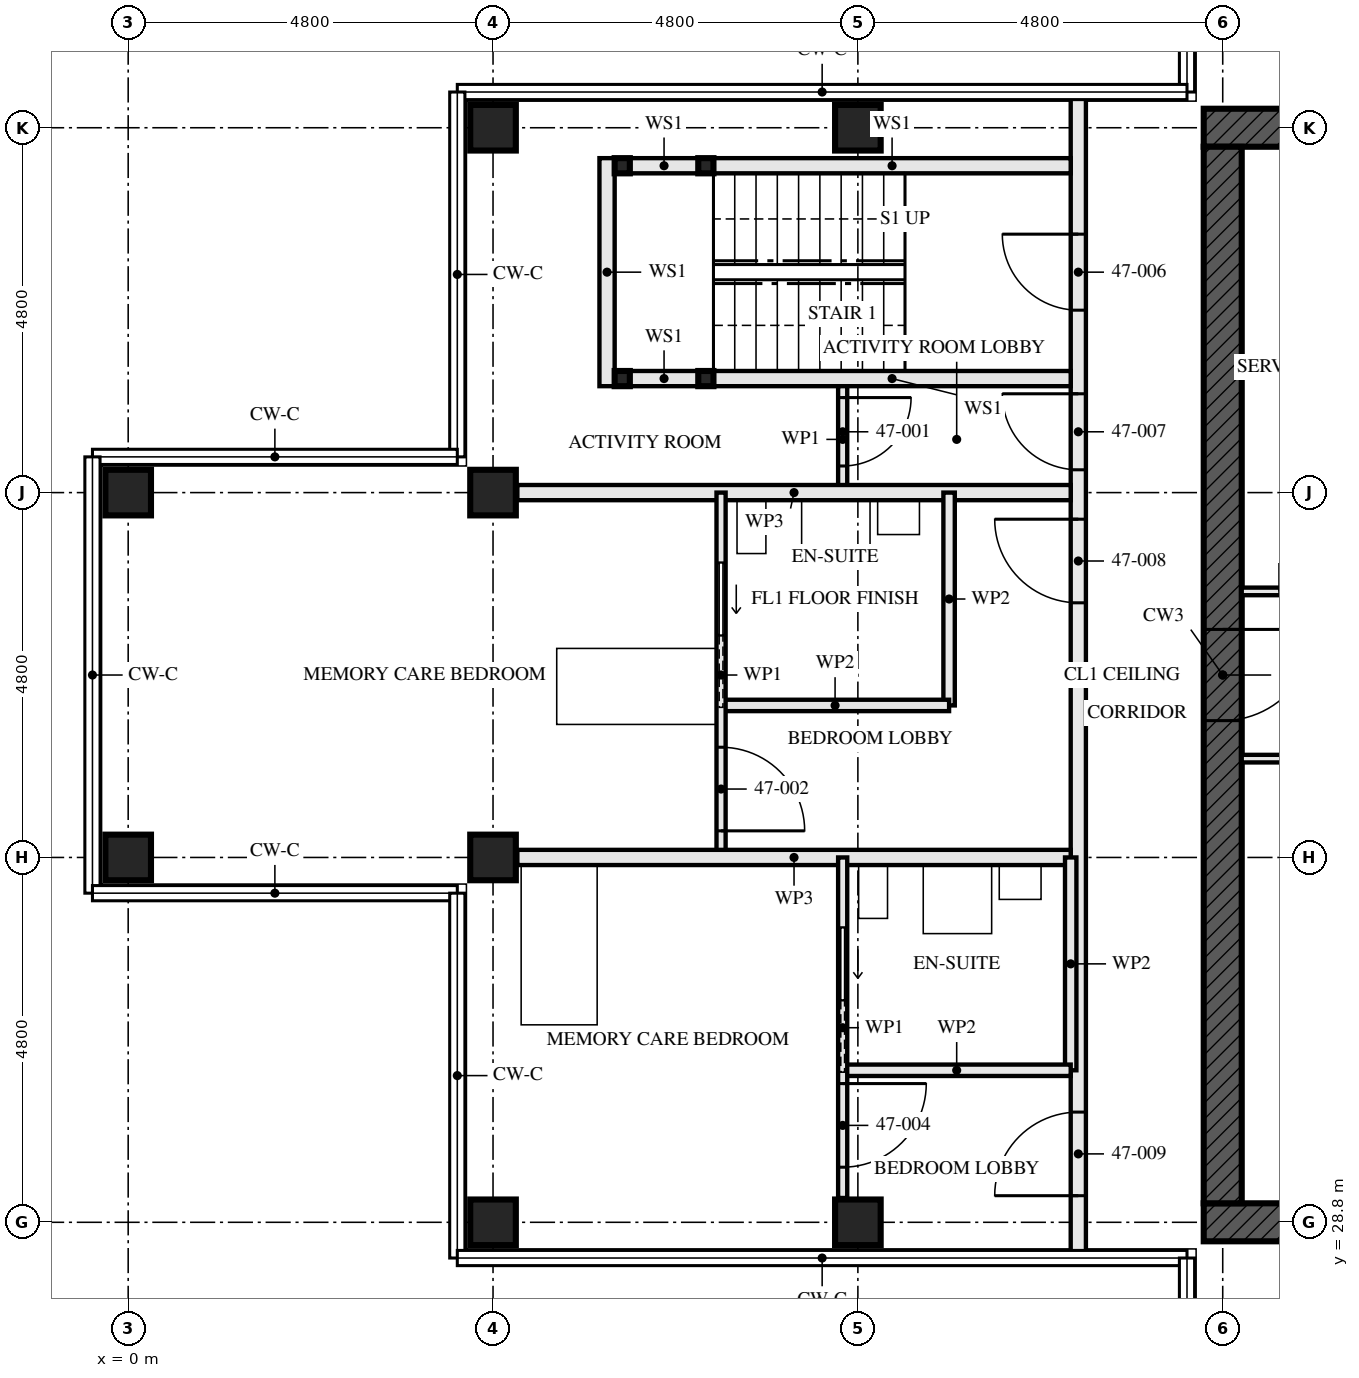
"""IFC4 building model, lengths in metres.
Left out: names, types, materials, properties, quantities, classifications, styles, units other than length and angle.
Written with IfcOpenShell. Run it as: python <this file> out.ifc"""

import sys

from ifc_helpers import new_model, si_unit, direction, frame, frame_2d, origin, origin_2d, place, context, subcontext, project, spatial, rectangle, hollow_rectangle, extrude, element, fill, save


model = new_model("IFC4")
c1 = context("Model", 3, precision=1e-05, world=origin(), true_north=direction((0.0, 1.0)))
c2 = subcontext(c1, "Body", "Model", "MODEL_VIEW")
j1 = project(units=[si_unit("LENGTHUNIT", "METRE"), si_unit("PLANEANGLEUNIT", "RADIAN")], contexts=[c1])
p1 = place(None, origin())
s1 = spatial("IfcSite", under=j1, at=p1, CompositionType="ELEMENT")
p2 = place(p1, origin())
s2 = spatial("IfcBuilding", under=s1, at=p2, CompositionType="ELEMENT")
p3 = place(p2, frame((0.0, 0.0, 172.5)))
s3 = spatial("IfcBuildingStorey", under=s2, at=p3, CompositionType="ELEMENT", Elevation=172.5)
for number, where, z_axis, x_axis in (
    (1, (0.0, 33.6, 0.0), (0.0, 0.0, 1.0), (0.0, 1.0, 0.0)),
    (2, (0.0, 38.4, 0.0), (0.0, 0.0, 1.0), (0.0, 1.0, 0.0)),
    (3, (4.8, 28.8, 0.0), (0.0, 0.0, 1.0), (0.0, 1.0, 0.0)),
    (4, (4.8, 33.6, 0.0), (0.0, 0.0, 1.0), (0.0, 1.0, 0.0)),
    (5, (4.8, 38.4, 0.0), (0.0, 0.0, 1.0), (0.0, 1.0, 0.0)),
    (6, (4.8, 43.2, 0.0), (0.0, 0.0, 1.0), (0.0, 1.0, 0.0)),
    (7, (9.6, 28.8, 0.0), (0.0, 0.0, 1.0), (0.0, 1.0, 0.0)),
    (8, (9.6, 43.2, 0.0), (0.0, 0.0, 1.0), (0.0, 1.0, 0.0)),
):
    element("IfcColumn", number, at=place(p3, frame(where, z_axis=z_axis, x_axis=x_axis)), inside=s3, PredefinedType="COLUMN", context=c2, shape_type="SweptSolid", body=[
        extrude(hollow_rectangle(XDim=0.6, YDim=0.6, WallThickness=0.08, at=origin_2d()), origin(), (0.0, 0.0, 1.0), 3.5),
    ])
p4 = place(p3, frame((14.15, 28.8, -0.17), z_axis=(0.0, 0.0, 1.0), x_axis=(1.0, 0.0, 0.0)))
e9 = element("IfcWall", 9, at=p4, inside=s3, PredefinedType="SHEAR", context=c2, shape_type="SweptSolid", body=[
    extrude(rectangle(XDim=14.9, YDim=0.5, at=frame_2d((7.45, 0.0))), origin(), (0.0, 0.0, 1.0), 3.5),
])
p5 = place(p4, frame((6.85, 0.0, 0.17)))
e10 = element("IfcOpeningElement", 10, at=p5, cuts=e9, PredefinedType="OPENING", context=c2, shape_type="SweptSolid", body=[
    extrude(rectangle(XDim=1.2, YDim=2.1, at=frame_2d((0.6, 1.05))), frame((0.0, 0.26, 0.0), z_axis=(0.0, -1.0, 0.0), x_axis=(1.0, 0.0, 0.0)), (0.0, 0.0, 1.0), 0.521),
])
p6 = place(p3, frame((29.05, 43.2, -0.17), z_axis=(0.0, 0.0, 1.0), x_axis=(-1.0, 0.0, 0.0)))
e11 = element("IfcWall", 11, at=p6, inside=s3, PredefinedType="SHEAR", context=c2, shape_type="SweptSolid", body=[
    extrude(rectangle(XDim=14.9, YDim=0.5, at=frame_2d((7.45, 0.0))), origin(), (0.0, 0.0, 1.0), 3.5),
])
p7 = place(p6, frame((6.85, 0.0, 0.17)))
e12 = element("IfcOpeningElement", 12, at=p7, cuts=e11, PredefinedType="OPENING", context=c2, shape_type="SweptSolid", body=[
    extrude(rectangle(XDim=1.2, YDim=2.1, at=frame_2d((0.6, 1.05))), frame((0.0, 0.26, 0.0), z_axis=(0.0, -1.0, 0.0), x_axis=(1.0, 0.0, 0.0)), (0.0, 0.0, 1.0), 0.521),
])
p8 = place(p3, frame((14.4, 42.95, -0.17), z_axis=(0.0, 0.0, 1.0), x_axis=(0.0, -1.0, 0.0)))
e13 = element("IfcWall", 13, at=p8, inside=s3, PredefinedType="SHEAR", context=c2, shape_type="SweptSolid", body=[
    extrude(rectangle(XDim=13.9, YDim=0.5, at=frame_2d((6.95, 0.0))), origin(), (0.0, 0.0, 1.0), 3.5),
])
p9 = place(p8, frame((6.35, 0.0, 0.17)))
e14 = element("IfcOpeningElement", 14, at=p9, cuts=e13, PredefinedType="OPENING", context=c2, shape_type="SweptSolid", body=[
    extrude(rectangle(XDim=1.2, YDim=2.1, at=frame_2d((0.6, 1.05))), frame((0.0, 0.26, 0.0), z_axis=(0.0, -1.0, 0.0), x_axis=(1.0, 0.0, 0.0)), (0.0, 0.0, 1.0), 0.521),
])
for number, where, z_axis, x_axis in (
    (15, (6.5, 42.7, 0.0), (0.0, 0.0, 1.0), (1.0, 0.0, 0.0)),
    (16, (6.5, 39.9, 0.0), (0.0, 0.0, 1.0), (1.0, 0.0, 0.0)),
    (17, (7.6, 42.7, 0.0), (0.0, 0.0, 1.0), (1.0, 0.0, 0.0)),
    (18, (7.6, 39.9, 0.0), (0.0, 0.0, 1.0), (1.0, 0.0, 0.0)),
):
    element("IfcColumn", number, at=place(p3, frame(where, z_axis=z_axis, x_axis=x_axis)), inside=s3, PredefinedType="COLUMN", context=c2, shape_type="SweptSolid", body=[
        extrude(hollow_rectangle(XDim=0.2, YDim=0.2, WallThickness=0.008, at=origin_2d()), origin(), (0.0, 0.0, 1.0), 3.33),
    ])
p10 = place(p3, frame((6.6, 42.7, 0.0), z_axis=(0.0, 0.0, 1.0), x_axis=(1.0, 0.0, 0.0)))
e19 = element("IfcWall", 19, at=p10, inside=s3, PredefinedType="SOLIDWALL", context=c2, shape_type="SweptSolid", body=[
    extrude(rectangle(XDim=0.9, YDim=0.2, at=frame_2d((0.45, 0.0))), origin(), (0.0, 0.0, 1.0), 2.99),
])
p11 = place(p3, frame((7.7, 42.7, 0.0), z_axis=(0.0, 0.0, 1.0), x_axis=(1.0, 0.0, 0.0)))
e20 = element("IfcWall", 20, at=p11, inside=s3, PredefinedType="SOLIDWALL", context=c2, shape_type="SweptSolid", body=[
    extrude(rectangle(XDim=4.7, YDim=0.2, at=frame_2d((2.35, 0.0))), origin(), (0.0, 0.0, 1.0), 2.99),
])
p12 = place(p3, frame((6.6, 39.9, 0.0), z_axis=(0.0, 0.0, 1.0), x_axis=(1.0, 0.0, 0.0)))
e21 = element("IfcWall", 21, at=p12, inside=s3, PredefinedType="SOLIDWALL", context=c2, shape_type="SweptSolid", body=[
    extrude(rectangle(XDim=0.9, YDim=0.2, at=frame_2d((0.45, 0.0))), origin(), (0.0, 0.0, 1.0), 2.99),
])
p13 = place(p3, frame((7.7, 39.9, 0.0), z_axis=(0.0, 0.0, 1.0), x_axis=(1.0, 0.0, 0.0)))
e22 = element("IfcWall", 22, at=p13, inside=s3, PredefinedType="SOLIDWALL", context=c2, shape_type="SweptSolid", body=[
    extrude(rectangle(XDim=4.7, YDim=0.2, at=frame_2d((2.35, 0.0))), origin(), (0.0, 0.0, 1.0), 2.99),
])
p14 = place(p3, frame((6.3, 42.8, 0.0), z_axis=(0.0, 0.0, 1.0), x_axis=(0.0, -1.0, 0.0)))
e23 = element("IfcWall", 23, at=p14, inside=s3, PredefinedType="SOLIDWALL", context=c2, shape_type="SweptSolid", body=[
    extrude(rectangle(XDim=3.0, YDim=0.2, at=frame_2d((1.5, 0.0))), origin(), (0.0, 0.0, 1.0), 3.33),
])
p15 = place(p3, frame((9.4, 39.8, 0.0), z_axis=(0.0, 0.0, 1.0), x_axis=(0.0, -1.0, 0.0)))
e24 = element("IfcWall", 24, at=p15, inside=s3, PredefinedType="PARTITIONING", context=c2, shape_type="SweptSolid", body=[
    extrude(rectangle(XDim=1.4, YDim=0.12, at=frame_2d((0.7, 0.0))), origin(), (0.0, 0.0, 1.0), 3.33),
])
p16 = place(p15, frame((0.15, 0.0, 0.0)))
e25 = element("IfcOpeningElement", 25, at=p16, cuts=e24, PredefinedType="OPENING", context=c2, shape_type="SweptSolid", body=[
    extrude(rectangle(XDim=0.9, YDim=2.1, at=frame_2d((0.45, 1.05))), frame((0.0, 0.071, 0.0), z_axis=(0.0, -1.0, 0.0), x_axis=(1.0, 0.0, 0.0)), (0.0, 0.0, 1.0), 0.141),
])
p17 = place(p3, frame((5.12, 38.4, 0.0), z_axis=(0.0, 0.0, 1.0), x_axis=(1.0, 0.0, 0.0)))
e26 = element("IfcWall", 26, at=p17, inside=s3, PredefinedType="PARTITIONING", context=c2, shape_type="SweptSolid", body=[
    extrude(rectangle(XDim=7.28, YDim=0.2, at=frame_2d((3.64, 0.0))), origin(), (0.0, 0.0, 1.0), 2.55),
])
p18 = place(p3, frame((7.8, 35.6, 0.0), z_axis=(0.0, 0.0, 1.0), x_axis=(1.0, 0.0, 0.0)))
e27 = element("IfcWall", 27, at=p18, inside=s3, PredefinedType="PARTITIONING", context=c2, shape_type="SweptSolid", body=[
    extrude(rectangle(XDim=3.0, YDim=0.15, at=frame_2d((1.5, 0.0))), origin(), (0.0, 0.0, 1.0), 3.33),
])
p19 = place(p3, frame((10.8, 38.4, 0.0), z_axis=(0.0, 0.0, 1.0), x_axis=(0.0, -1.0, 0.0)))
e28 = element("IfcWall", 28, at=p19, inside=s3, PredefinedType="PARTITIONING", context=c2, shape_type="SweptSolid", body=[
    extrude(rectangle(XDim=2.8, YDim=0.15, at=frame_2d((1.4, 0.0))), origin(), (0.0, 0.0, 1.0), 3.33),
])
p20 = place(p3, frame((7.8, 38.4, 0.0), z_axis=(0.0, 0.0, 1.0), x_axis=(0.0, -1.0, 0.0)))
e29 = element("IfcWall", 29, at=p20, inside=s3, PredefinedType="PARTITIONING", context=c2, shape_type="SweptSolid", body=[
    extrude(rectangle(XDim=4.8, YDim=0.12, at=frame_2d((2.4, 0.0))), origin(), (0.0, 0.0, 1.0), 3.33),
])
p21 = place(p20, frame((3.35, 0.0, 0.0)))
e30 = element("IfcOpeningElement", 30, at=p21, cuts=e29, PredefinedType="OPENING", context=c2, shape_type="SweptSolid", body=[
    extrude(rectangle(XDim=1.1, YDim=2.1, at=frame_2d((0.55, 1.05))), frame((0.0, 0.071, 0.0), z_axis=(0.0, -1.0, 0.0), x_axis=(1.0, 0.0, 0.0)), (0.0, 0.0, 1.0), 0.141),
])
p22 = place(p20, frame((0.925, 0.0, 0.0)))
e31 = element("IfcOpeningElement", 31, at=p22, cuts=e29, PredefinedType="OPENING", context=c2, shape_type="SweptSolid", body=[
    extrude(rectangle(XDim=0.95, YDim=2.1, at=frame_2d((0.475, 1.05))), frame((0.0, 0.071, 0.0), z_axis=(0.0, -1.0, 0.0), x_axis=(1.0, 0.0, 0.0)), (0.0, 0.0, 1.0), 0.141),
])
p23 = place(p3, frame((5.12, 33.6, 0.0), z_axis=(0.0, 0.0, 1.0), x_axis=(1.0, 0.0, 0.0)))
e32 = element("IfcWall", 32, at=p23, inside=s3, PredefinedType="PARTITIONING", context=c2, shape_type="SweptSolid", body=[
    extrude(rectangle(XDim=7.28, YDim=0.2, at=frame_2d((3.64, 0.0))), origin(), (0.0, 0.0, 1.0), 2.55),
])
p24 = place(p3, frame((9.4, 30.8, 0.0), z_axis=(0.0, 0.0, 1.0), x_axis=(1.0, 0.0, 0.0)))
e33 = element("IfcWall", 33, at=p24, inside=s3, PredefinedType="PARTITIONING", context=c2, shape_type="SweptSolid", body=[
    extrude(rectangle(XDim=3.0, YDim=0.15, at=frame_2d((1.5, 0.0))), origin(), (0.0, 0.0, 1.0), 3.33),
])
p25 = place(p3, frame((12.4, 33.6, 0.0), z_axis=(0.0, 0.0, 1.0), x_axis=(0.0, -1.0, 0.0)))
e34 = element("IfcWall", 34, at=p25, inside=s3, PredefinedType="PARTITIONING", context=c2, shape_type="SweptSolid", body=[
    extrude(rectangle(XDim=2.8, YDim=0.15, at=frame_2d((1.4, 0.0))), origin(), (0.0, 0.0, 1.0), 3.33),
])
p26 = place(p3, frame((9.4, 33.6, 0.0), z_axis=(0.0, 0.0, 1.0), x_axis=(0.0, -1.0, 0.0)))
e35 = element("IfcWall", 35, at=p26, inside=s3, PredefinedType="PARTITIONING", context=c2, shape_type="SweptSolid", body=[
    extrude(rectangle(XDim=4.48, YDim=0.12, at=frame_2d((2.24, 0.0))), origin(), (0.0, 0.0, 1.0), 3.33),
])
p27 = place(p26, frame((2.975, 0.0, 0.0)))
e36 = element("IfcOpeningElement", 36, at=p27, cuts=e35, PredefinedType="OPENING", context=c2, shape_type="SweptSolid", body=[
    extrude(rectangle(XDim=1.1, YDim=2.1, at=frame_2d((0.55, 1.05))), frame((0.0, 0.071, 0.0), z_axis=(0.0, -1.0, 0.0), x_axis=(1.0, 0.0, 0.0)), (0.0, 0.0, 1.0), 0.141),
])
p28 = place(p26, frame((0.925, 0.0, 0.0)))
e37 = element("IfcOpeningElement", 37, at=p28, cuts=e35, PredefinedType="OPENING", context=c2, shape_type="SweptSolid", body=[
    extrude(rectangle(XDim=0.95, YDim=2.1, at=frame_2d((0.475, 1.05))), frame((0.0, 0.071, 0.0), z_axis=(0.0, -1.0, 0.0), x_axis=(1.0, 0.0, 0.0)), (0.0, 0.0, 1.0), 0.141),
])
p29 = place(p3, frame((12.5, 43.65, 0.0), z_axis=(0.0, 0.0, 1.0), x_axis=(0.0, -1.0, 0.0)))
e38 = element("IfcWall", 38, at=p29, inside=s3, PredefinedType="PARTITIONING", context=c2, shape_type="SweptSolid", body=[
    extrude(rectangle(XDim=15.3, YDim=0.2, at=frame_2d((7.65, 0.0))), origin(), (0.0, 0.0, 1.0), 2.32),
])
p30 = place(p29, frame((1.85, 0.0, 0.0)))
e39 = element("IfcOpeningElement", 39, at=p30, cuts=e38, PredefinedType="OPENING", context=c2, shape_type="SweptSolid", body=[
    extrude(rectangle(XDim=1.0, YDim=2.1, at=frame_2d((0.5, 1.05))), frame((0.0, 0.111, 0.0), z_axis=(0.0, -1.0, 0.0), x_axis=(1.0, 0.0, 0.0)), (0.0, 0.0, 1.0), 0.221),
])
p31 = place(p29, frame((3.95, 0.0, 0.0)))
e40 = element("IfcOpeningElement", 40, at=p31, cuts=e38, PredefinedType="OPENING", context=c2, shape_type="SweptSolid", body=[
    extrude(rectangle(XDim=1.0, YDim=2.1, at=frame_2d((0.5, 1.05))), frame((0.0, 0.111, 0.0), z_axis=(0.0, -1.0, 0.0), x_axis=(1.0, 0.0, 0.0)), (0.0, 0.0, 1.0), 0.221),
])
p32 = place(p29, frame((5.6, 0.0, 0.0)))
e41 = element("IfcOpeningElement", 41, at=p32, cuts=e38, PredefinedType="OPENING", context=c2, shape_type="SweptSolid", body=[
    extrude(rectangle(XDim=1.1, YDim=2.1, at=frame_2d((0.55, 1.05))), frame((0.0, 0.111, 0.0), z_axis=(0.0, -1.0, 0.0), x_axis=(1.0, 0.0, 0.0)), (0.0, 0.0, 1.0), 0.221),
])
p33 = place(p29, frame((13.4, 0.0, 0.0)))
e42 = element("IfcOpeningElement", 42, at=p33, cuts=e38, PredefinedType="OPENING", context=c2, shape_type="SweptSolid", body=[
    extrude(rectangle(XDim=1.1, YDim=2.1, at=frame_2d((0.55, 1.05))), frame((0.0, 0.111, 0.0), z_axis=(0.0, -1.0, 0.0), x_axis=(1.0, 0.0, 0.0)), (0.0, 0.0, 1.0), 0.221),
])
p34 = place(p3, frame((14.65, 34.9, 0.0), z_axis=(0.0, 0.0, 1.0), x_axis=(1.0, 0.0, 0.0)))
e43 = element("IfcWall", 43, at=p34, inside=s3, PredefinedType="SOLIDWALL", context=c2, shape_type="SweptSolid", body=[
    extrude(rectangle(XDim=5.9, YDim=0.1, at=frame_2d((2.95, 0.0))), origin(), (0.0, 0.0, 1.0), 3.33),
])
p35 = place(p34, frame((1.6, 0.0, 0.0)))
e44 = element("IfcOpeningElement", 44, at=p35, cuts=e43, PredefinedType="OPENING", context=c2, shape_type="SweptSolid", body=[
    extrude(rectangle(XDim=0.7, YDim=2.1, at=frame_2d((0.35, 1.05))), frame((0.0, 0.061, 0.0), z_axis=(0.0, -1.0, 0.0), x_axis=(1.0, 0.0, 0.0)), (0.0, 0.0, 1.0), 0.121),
])
p36 = place(p3, frame((14.65, 37.1, 0.0), z_axis=(0.0, 0.0, 1.0), x_axis=(1.0, 0.0, 0.0)))
e45 = element("IfcWall", 45, at=p36, inside=s3, PredefinedType="SOLIDWALL", context=c2, shape_type="SweptSolid", body=[
    extrude(rectangle(XDim=5.9, YDim=0.1, at=frame_2d((2.95, 0.0))), origin(), (0.0, 0.0, 1.0), 3.33),
])
p37 = place(p36, frame((0.5, 0.0, 0.0)))
e46 = element("IfcOpeningElement", 46, at=p37, cuts=e45, PredefinedType="OPENING", context=c2, shape_type="SweptSolid", body=[
    extrude(rectangle(XDim=0.7, YDim=2.1, at=frame_2d((0.35, 1.05))), frame((0.0, 0.061, 0.0), z_axis=(0.0, -1.0, 0.0), x_axis=(1.0, 0.0, 0.0)), (0.0, 0.0, 1.0), 0.121),
])
p38 = place(p36, frame((1.9, 0.0, 0.0)))
e47 = element("IfcOpeningElement", 47, at=p38, cuts=e45, PredefinedType="OPENING", context=c2, shape_type="SweptSolid", body=[
    extrude(rectangle(XDim=0.9, YDim=2.1, at=frame_2d((0.45, 1.05))), frame((0.0, 0.061, 0.0), z_axis=(0.0, -1.0, 0.0), x_axis=(1.0, 0.0, 0.0)), (0.0, 0.0, 1.0), 0.121),
])
p39 = place(p16, origin())
e48 = element("IfcDoor", 48, at=p39, inside=s3, OperationType="SINGLE_SWING_RIGHT", PredefinedType="DOOR", context=c2, shape_type="SweptSolid", body=[
    extrude(rectangle(XDim=0.9, YDim=2.1, at=frame_2d((0.45, 1.05))), frame((0.0, 0.022, 0.0), z_axis=(0.0, -1.0, 0.0), x_axis=(1.0, 0.0, 0.0)), (0.0, 0.0, 1.0), 0.044),
])
fill(e25, e48)
p40 = place(p21, origin())
e49 = element("IfcDoor", 49, at=p40, inside=s3, OperationType="SINGLE_SWING_LEFT", PredefinedType="DOOR", context=c2, shape_type="SweptSolid", body=[
    extrude(rectangle(XDim=1.1, YDim=2.1, at=frame_2d((0.55, 1.05))), frame((0.0, 0.022, 0.0), z_axis=(0.0, -1.0, 0.0), x_axis=(1.0, 0.0, 0.0)), (0.0, 0.0, 1.0), 0.044),
])
fill(e30, e49)
p41 = place(p22, origin())
e50 = element("IfcDoor", 50, at=p41, inside=s3, OperationType="SLIDING_TO_LEFT", PredefinedType="DOOR", context=c2, shape_type="SweptSolid", body=[
    extrude(rectangle(XDim=0.95, YDim=2.1, at=frame_2d((0.475, 1.05))), frame((0.0, 0.022, 0.0), z_axis=(0.0, -1.0, 0.0), x_axis=(1.0, 0.0, 0.0)), (0.0, 0.0, 1.0), 0.044),
])
fill(e31, e50)
p42 = place(p27, origin())
e51 = element("IfcDoor", 51, at=p42, inside=s3, OperationType="SINGLE_SWING_RIGHT", PredefinedType="DOOR", context=c2, shape_type="SweptSolid", body=[
    extrude(rectangle(XDim=1.1, YDim=2.1, at=frame_2d((0.55, 1.05))), frame((0.0, 0.022, 0.0), z_axis=(0.0, -1.0, 0.0), x_axis=(1.0, 0.0, 0.0)), (0.0, 0.0, 1.0), 0.044),
])
fill(e36, e51)
p43 = place(p28, origin())
e52 = element("IfcDoor", 52, at=p43, inside=s3, OperationType="SLIDING_TO_LEFT", PredefinedType="DOOR", context=c2, shape_type="SweptSolid", body=[
    extrude(rectangle(XDim=0.95, YDim=2.1, at=frame_2d((0.475, 1.05))), frame((0.0, 0.022, 0.0), z_axis=(0.0, -1.0, 0.0), x_axis=(1.0, 0.0, 0.0)), (0.0, 0.0, 1.0), 0.044),
])
fill(e37, e52)
p44 = place(p30, frame((1.0, 0.0, 0.0), z_axis=(0.0, 0.0, 1.0), x_axis=(-1.0, 0.0, 0.0)))
e53 = element("IfcDoor", 53, at=p44, inside=s3, OperationType="SINGLE_SWING_LEFT", PredefinedType="DOOR", context=c2, shape_type="SweptSolid", body=[
    extrude(rectangle(XDim=1.0, YDim=2.1, at=frame_2d((0.5, 1.05))), frame((0.0, 0.032, 0.0), z_axis=(0.0, -1.0, 0.0), x_axis=(1.0, 0.0, 0.0)), (0.0, 0.0, 1.0), 0.064),
])
fill(e39, e53)
p45 = place(p31, frame((1.0, 0.0, 0.0), z_axis=(0.0, 0.0, 1.0), x_axis=(-1.0, 0.0, 0.0)))
e54 = element("IfcDoor", 54, at=p45, inside=s3, OperationType="SINGLE_SWING_LEFT", PredefinedType="DOOR", context=c2, shape_type="SweptSolid", body=[
    extrude(rectangle(XDim=1.0, YDim=2.1, at=frame_2d((0.5, 1.05))), frame((0.0, 0.027, 0.0), z_axis=(0.0, -1.0, 0.0), x_axis=(1.0, 0.0, 0.0)), (0.0, 0.0, 1.0), 0.054),
])
fill(e40, e54)
p46 = place(p32, frame((1.1, 0.0, 0.0), z_axis=(0.0, 0.0, 1.0), x_axis=(-1.0, 0.0, 0.0)))
e55 = element("IfcDoor", 55, at=p46, inside=s3, OperationType="SINGLE_SWING_LEFT", PredefinedType="DOOR", context=c2, shape_type="SweptSolid", body=[
    extrude(rectangle(XDim=1.1, YDim=2.1, at=frame_2d((0.55, 1.05))), frame((0.0, 0.027, 0.0), z_axis=(0.0, -1.0, 0.0), x_axis=(1.0, 0.0, 0.0)), (0.0, 0.0, 1.0), 0.054),
])
fill(e41, e55)
p47 = place(p33, frame((1.1, 0.0, 0.0), z_axis=(0.0, 0.0, 1.0), x_axis=(-1.0, 0.0, 0.0)))
e56 = element("IfcDoor", 56, at=p47, inside=s3, OperationType="SINGLE_SWING_RIGHT", PredefinedType="DOOR", context=c2, shape_type="SweptSolid", body=[
    extrude(rectangle(XDim=1.1, YDim=2.1, at=frame_2d((0.55, 1.05))), frame((0.0, 0.027, 0.0), z_axis=(0.0, -1.0, 0.0), x_axis=(1.0, 0.0, 0.0)), (0.0, 0.0, 1.0), 0.054),
])
fill(e42, e56)
p48 = place(p9, origin())
e57 = element("IfcDoor", 57, at=p48, inside=s3, OperationType="SINGLE_SWING_LEFT", PredefinedType="DOOR", context=c2, shape_type="SweptSolid", body=[
    extrude(rectangle(XDim=1.2, YDim=2.1, at=frame_2d((0.6, 1.05))), frame((0.0, 0.027, 0.0), z_axis=(0.0, -1.0, 0.0), x_axis=(1.0, 0.0, 0.0)), (0.0, 0.0, 1.0), 0.054),
])
fill(e14, e57)
save(model, sys.argv[1])
